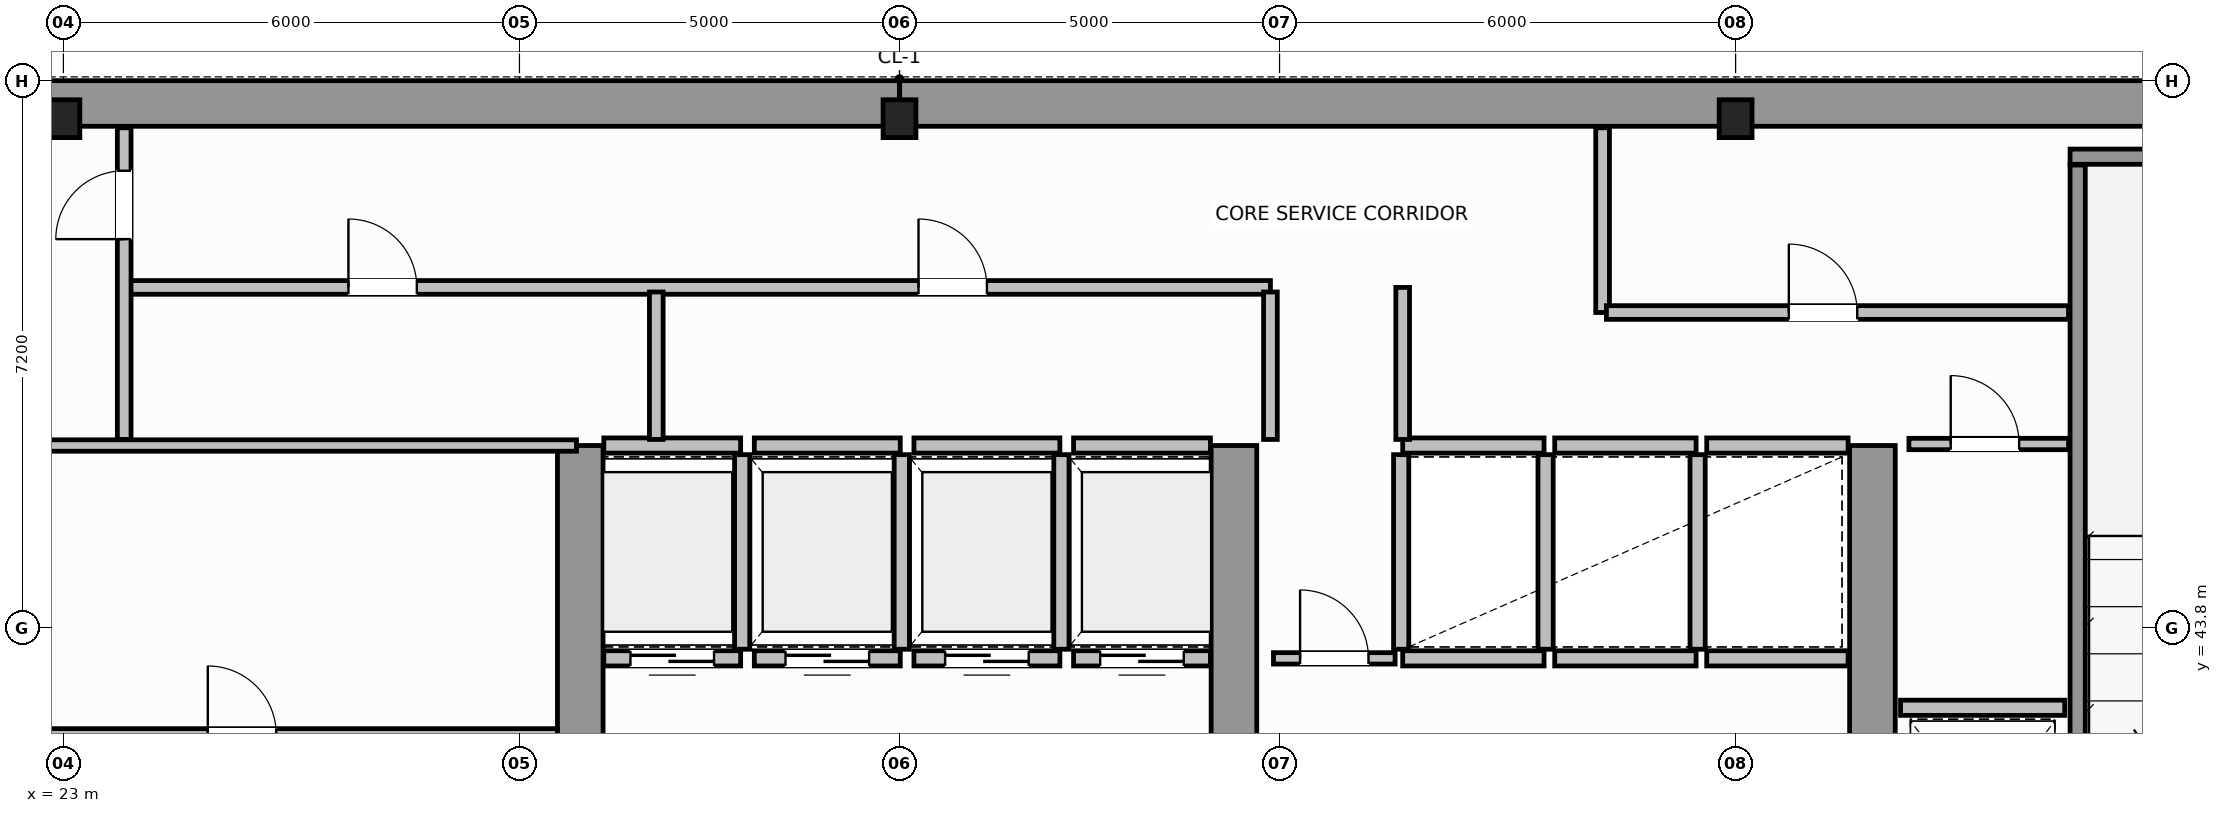
"""IFC4 building model, lengths in metres.
Left out: names, types, materials, properties, quantities, classifications, styles, units other than length and angle.
Written with IfcOpenShell. Run it as: python <this file> out.ifc"""

import sys

from ifc_helpers import new_model, si_unit, direction, frame, frame_2d, origin, origin_2d, place, context, subcontext, project, spatial, rectangle, i_section, extrude, source, transform, mapped, element, fill, save


model = new_model("IFC4")
c1 = context("Model", 3, precision=1e-05, world=origin(), true_north=direction((0.0, 1.0)))
c2 = subcontext(c1, "Body", "Model", "MODEL_VIEW")
j1 = project(units=[si_unit("LENGTHUNIT", "METRE"), si_unit("PLANEANGLEUNIT", "RADIAN")], contexts=[c1])
p1 = place(None, origin())
s1 = spatial("IfcSite", under=j1, at=p1, CompositionType="ELEMENT")
p2 = place(p1, origin())
s2 = spatial("IfcBuilding", under=s1, at=p2, CompositionType="ELEMENT")
p3 = place(p2, frame((0.0, 0.0, 169.0)))
s3 = spatial("IfcBuildingStorey", under=s2, at=p3, CompositionType="ELEMENT", Elevation=169.0)
m1 = source(origin(), c2, "Body", "SweptSolid", [
    extrude(i_section(OverallWidth=0.432, OverallDepth=0.498, WebThickness=0.055, FlangeThickness=0.068, FilletRadius=0.015, at=origin_2d()), origin(), (0.0, 0.0, 1.0), 3.8),
])
for number, where, z_axis, x_axis in (
    (1, (23.0, 50.5, 0.0), (0.0, 0.0, 1.0), (1.0, 0.0, 0.0)),
    (2, (34.0, 50.5, 0.0), (0.0, 0.0, 1.0), (1.0, 0.0, 0.0)),
    (3, (45.0, 50.5, 0.0), (0.0, 0.0, 1.0), (1.0, 0.0, 0.0)),
):
    element("IfcColumn", number, at=place(p3, frame(where, z_axis=z_axis, x_axis=x_axis)), inside=s3, PredefinedType="COLUMN", context=c2, shape_type="MappedRepresentation", body=[
        mapped(m1, transform((0.0, 0.0, 0.0), scale=1.0)),
    ])
for number, where, z_axis, x_axis in (
    (4, (14.304, 50.7, 0.0), (0.0, 0.0, 1.0), (1.0, 0.0, 0.0)),
    (5, (34.002, 50.7, 0.0), (0.0, 0.0, 1.0), (1.0, 0.0, 0.0)),
):
    element("IfcWall", number, at=place(p3, frame(where, z_axis=z_axis, x_axis=x_axis)), inside=s3, PredefinedType="SHEAR", context=c2, shape_type="SweptSolid", body=[
        extrude(rectangle(XDim=19.694, YDim=0.6, at=frame_2d((9.847, 0.0))), origin(), (0.0, 0.0, 1.0), 3.8),
    ])
for number, where, z_axis, x_axis in (
    (6, (29.8, 36.82, 0.0), (0.0, 0.0, 1.0), (0.0, 1.0, 0.0)),
    (7, (38.4, 36.82, 0.0), (0.0, 0.0, 1.0), (0.0, 1.0, 0.0)),
    (8, (46.8, 36.82, 0.0), (0.0, 0.0, 1.0), (0.0, 1.0, 0.0)),
):
    element("IfcWall", number, at=place(p3, frame(where, z_axis=z_axis, x_axis=x_axis)), inside=s3, PredefinedType="SHEAR", context=c2, shape_type="SweptSolid", body=[
        extrude(rectangle(XDim=9.38, YDim=0.6, at=frame_2d((4.69, 0.0))), origin(), (0.0, 0.0, 1.0), 3.8),
    ])
p4 = place(p3, frame((49.4, 50.0, 0.0), z_axis=(0.0, 0.0, 1.0), x_axis=(1.0, 0.0, 0.0)))
e9 = element("IfcWall", 9, at=p4, inside=s3, PredefinedType="SOLIDWALL", context=c2, shape_type="SweptSolid", body=[
    extrude(rectangle(XDim=4.3, YDim=0.2, at=frame_2d((2.15, 0.0))), origin(), (0.0, 0.0, 1.0), 3.8),
])
p5 = place(p3, frame((49.5, 39.96, 0.0), z_axis=(0.0, 0.0, 1.0), x_axis=(0.0, 1.0, 0.0)))
e10 = element("IfcWall", 10, at=p5, inside=s3, PredefinedType="SOLIDWALL", context=c2, shape_type="SweptSolid", body=[
    extrude(rectangle(XDim=9.93, YDim=0.2, at=frame_2d((4.965, 0.0))), origin(), (0.0, 0.0, 1.0), 3.8),
])
p6 = place(p3, frame((30.11, 43.4, 0.0), z_axis=(0.0, 0.0, 1.0), x_axis=(1.0, 0.0, 0.0)))
e11 = element("IfcWall", 11, at=p6, inside=s3, PredefinedType="SOLIDWALL", context=c2, shape_type="SweptSolid", body=[
    extrude(rectangle(XDim=1.8, YDim=0.2, at=frame_2d((0.9, 0.0))), origin(), (0.0, 0.0, 1.0), 3.58),
])
p7 = place(p6, frame((0.35, 0.0, 0.0)))
e12 = element("IfcOpeningElement", 12, at=p7, cuts=e11, PredefinedType="OPENING", context=c2, shape_type="SweptSolid", body=[
    extrude(rectangle(XDim=1.1, YDim=2.15, at=frame_2d((0.55, 1.075))), frame((0.0, 0.11, 0.0), z_axis=(0.0, -1.0, 0.0), x_axis=(1.0, 0.0, 0.0)), (0.0, 0.0, 1.0), 0.22),
])
p8 = place(p3, frame((30.11, 46.2, 0.0), z_axis=(0.0, 0.0, 1.0), x_axis=(1.0, 0.0, 0.0)))
e13 = element("IfcWall", 13, at=p8, inside=s3, PredefinedType="SOLIDWALL", context=c2, shape_type="SweptSolid", body=[
    extrude(rectangle(XDim=1.8, YDim=0.2, at=frame_2d((0.9, 0.0))), origin(), (0.0, 0.0, 1.0), 3.58),
])
p9 = place(p3, frame((31.93, 43.52, 0.0), z_axis=(0.0, 0.0, 1.0), x_axis=(0.0, 1.0, 0.0)))
e14 = element("IfcWall", 14, at=p9, inside=s3, PredefinedType="SOLIDWALL", context=c2, shape_type="SweptSolid", body=[
    extrude(rectangle(XDim=2.56, YDim=0.2, at=frame_2d((1.28, 0.0))), origin(), (0.0, 0.0, 1.0), 3.58),
])
p10 = place(p3, frame((32.09, 43.4, 0.0), z_axis=(0.0, 0.0, 1.0), x_axis=(1.0, 0.0, 0.0)))
e15 = element("IfcWall", 15, at=p10, inside=s3, PredefinedType="SOLIDWALL", context=c2, shape_type="SweptSolid", body=[
    extrude(rectangle(XDim=1.92, YDim=0.2, at=frame_2d((0.96, 0.0))), origin(), (0.0, 0.0, 1.0), 3.58),
])
p11 = place(p10, frame((0.41, 0.0, 0.0)))
e16 = element("IfcOpeningElement", 16, at=p11, cuts=e15, PredefinedType="OPENING", context=c2, shape_type="SweptSolid", body=[
    extrude(rectangle(XDim=1.1, YDim=2.15, at=frame_2d((0.55, 1.075))), frame((0.0, 0.11, 0.0), z_axis=(0.0, -1.0, 0.0), x_axis=(1.0, 0.0, 0.0)), (0.0, 0.0, 1.0), 0.22),
])
p12 = place(p3, frame((32.09, 46.2, 0.0), z_axis=(0.0, 0.0, 1.0), x_axis=(1.0, 0.0, 0.0)))
e17 = element("IfcWall", 17, at=p12, inside=s3, PredefinedType="SOLIDWALL", context=c2, shape_type="SweptSolid", body=[
    extrude(rectangle(XDim=1.92, YDim=0.2, at=frame_2d((0.96, 0.0))), origin(), (0.0, 0.0, 1.0), 3.58),
])
p13 = place(p3, frame((34.03, 43.52, 0.0), z_axis=(0.0, 0.0, 1.0), x_axis=(0.0, 1.0, 0.0)))
e18 = element("IfcWall", 18, at=p13, inside=s3, PredefinedType="SOLIDWALL", context=c2, shape_type="SweptSolid", body=[
    extrude(rectangle(XDim=2.56, YDim=0.2, at=frame_2d((1.28, 0.0))), origin(), (0.0, 0.0, 1.0), 3.58),
])
p14 = place(p3, frame((34.19, 43.4, 0.0), z_axis=(0.0, 0.0, 1.0), x_axis=(1.0, 0.0, 0.0)))
e19 = element("IfcWall", 19, at=p14, inside=s3, PredefinedType="SOLIDWALL", context=c2, shape_type="SweptSolid", body=[
    extrude(rectangle(XDim=1.92, YDim=0.2, at=frame_2d((0.96, 0.0))), origin(), (0.0, 0.0, 1.0), 3.58),
])
p15 = place(p14, frame((0.41, 0.0, 0.0)))
e20 = element("IfcOpeningElement", 20, at=p15, cuts=e19, PredefinedType="OPENING", context=c2, shape_type="SweptSolid", body=[
    extrude(rectangle(XDim=1.1, YDim=2.15, at=frame_2d((0.55, 1.075))), frame((0.0, 0.11, 0.0), z_axis=(0.0, -1.0, 0.0), x_axis=(1.0, 0.0, 0.0)), (0.0, 0.0, 1.0), 0.22),
])
p16 = place(p3, frame((34.19, 46.2, 0.0), z_axis=(0.0, 0.0, 1.0), x_axis=(1.0, 0.0, 0.0)))
e21 = element("IfcWall", 21, at=p16, inside=s3, PredefinedType="SOLIDWALL", context=c2, shape_type="SweptSolid", body=[
    extrude(rectangle(XDim=1.92, YDim=0.2, at=frame_2d((0.96, 0.0))), origin(), (0.0, 0.0, 1.0), 3.58),
])
p17 = place(p3, frame((36.13, 43.52, 0.0), z_axis=(0.0, 0.0, 1.0), x_axis=(0.0, 1.0, 0.0)))
e22 = element("IfcWall", 22, at=p17, inside=s3, PredefinedType="SOLIDWALL", context=c2, shape_type="SweptSolid", body=[
    extrude(rectangle(XDim=2.56, YDim=0.2, at=frame_2d((1.28, 0.0))), origin(), (0.0, 0.0, 1.0), 3.58),
])
p18 = place(p3, frame((36.29, 43.4, 0.0), z_axis=(0.0, 0.0, 1.0), x_axis=(1.0, 0.0, 0.0)))
e23 = element("IfcWall", 23, at=p18, inside=s3, PredefinedType="SOLIDWALL", context=c2, shape_type="SweptSolid", body=[
    extrude(rectangle(XDim=1.8, YDim=0.2, at=frame_2d((0.9, 0.0))), origin(), (0.0, 0.0, 1.0), 3.58),
])
p19 = place(p18, frame((0.35, 0.0, 0.0)))
e24 = element("IfcOpeningElement", 24, at=p19, cuts=e23, PredefinedType="OPENING", context=c2, shape_type="SweptSolid", body=[
    extrude(rectangle(XDim=1.1, YDim=2.15, at=frame_2d((0.55, 1.075))), frame((0.0, 0.11, 0.0), z_axis=(0.0, -1.0, 0.0), x_axis=(1.0, 0.0, 0.0)), (0.0, 0.0, 1.0), 0.22),
])
p20 = place(p3, frame((36.29, 46.2, 0.0), z_axis=(0.0, 0.0, 1.0), x_axis=(1.0, 0.0, 0.0)))
e25 = element("IfcWall", 25, at=p20, inside=s3, PredefinedType="SOLIDWALL", context=c2, shape_type="SweptSolid", body=[
    extrude(rectangle(XDim=1.8, YDim=0.2, at=frame_2d((0.9, 0.0))), origin(), (0.0, 0.0, 1.0), 3.58),
])
for number, where, z_axis, x_axis in (
    (26, (40.62, 43.4, 0.0), (0.0, 0.0, 1.0), (1.0, 0.0, 0.0)),
    (27, (40.62, 46.2, 0.0), (0.0, 0.0, 1.0), (1.0, 0.0, 0.0)),
):
    element("IfcWall", number, at=place(p3, frame(where, z_axis=z_axis, x_axis=x_axis)), inside=s3, PredefinedType="SOLIDWALL", context=c2, shape_type="SweptSolid", body=[
        extrude(rectangle(XDim=1.86, YDim=0.2, at=frame_2d((0.93, 0.0))), origin(), (0.0, 0.0, 1.0), 3.58),
    ])
for number, where, z_axis, x_axis in (
    (28, (40.6, 43.52, 0.0), (0.0, 0.0, 1.0), (0.0, 1.0, 0.0)),
    (29, (42.5, 43.52, 0.0), (0.0, 0.0, 1.0), (0.0, 1.0, 0.0)),
):
    element("IfcWall", number, at=place(p3, frame(where, z_axis=z_axis, x_axis=x_axis)), inside=s3, PredefinedType="SOLIDWALL", context=c2, shape_type="SweptSolid", body=[
        extrude(rectangle(XDim=2.56, YDim=0.2, at=frame_2d((1.28, 0.0))), origin(), (0.0, 0.0, 1.0), 3.58),
    ])
for number, where, z_axis, x_axis in (
    (30, (42.62, 43.4, 0.0), (0.0, 0.0, 1.0), (1.0, 0.0, 0.0)),
    (31, (42.62, 46.2, 0.0), (0.0, 0.0, 1.0), (1.0, 0.0, 0.0)),
):
    element("IfcWall", number, at=place(p3, frame(where, z_axis=z_axis, x_axis=x_axis)), inside=s3, PredefinedType="SOLIDWALL", context=c2, shape_type="SweptSolid", body=[
        extrude(rectangle(XDim=1.86, YDim=0.2, at=frame_2d((0.93, 0.0))), origin(), (0.0, 0.0, 1.0), 3.58),
    ])
p21 = place(p3, frame((44.5, 43.52, 0.0), z_axis=(0.0, 0.0, 1.0), x_axis=(0.0, 1.0, 0.0)))
e32 = element("IfcWall", 32, at=p21, inside=s3, PredefinedType="SOLIDWALL", context=c2, shape_type="SweptSolid", body=[
    extrude(rectangle(XDim=2.56, YDim=0.2, at=frame_2d((1.28, 0.0))), origin(), (0.0, 0.0, 1.0), 3.58),
])
for number, where, z_axis, x_axis in (
    (33, (44.62, 43.4, 0.0), (0.0, 0.0, 1.0), (1.0, 0.0, 0.0)),
    (34, (44.62, 46.2, 0.0), (0.0, 0.0, 1.0), (1.0, 0.0, 0.0)),
):
    element("IfcWall", number, at=place(p3, frame(where, z_axis=z_axis, x_axis=x_axis)), inside=s3, PredefinedType="SOLIDWALL", context=c2, shape_type="SweptSolid", body=[
        extrude(rectangle(XDim=1.86, YDim=0.2, at=frame_2d((0.93, 0.0))), origin(), (0.0, 0.0, 1.0), 3.58),
    ])
p22 = place(p3, frame((47.17, 42.75, 0.0), z_axis=(0.0, 0.0, 1.0), x_axis=(1.0, 0.0, 0.0)))
e35 = element("IfcWall", 35, at=p22, inside=s3, PredefinedType="SOLIDWALL", context=c2, shape_type="SweptSolid", body=[
    extrude(rectangle(XDim=2.16, YDim=0.2, at=frame_2d((1.08, 0.0))), origin(), (0.0, 0.0, 1.0), 3.58),
])
p23 = place(p3, frame((21.25, 46.2, 0.0), z_axis=(0.0, 0.0, 1.0), x_axis=(1.0, 0.0, 0.0)))
e36 = element("IfcWall", 36, at=p23, inside=s3, PredefinedType="PARTITIONING", context=c2, shape_type="SweptSolid", body=[
    extrude(rectangle(XDim=8.5, YDim=0.15, at=frame_2d((4.25, 0.0))), origin(), (0.0, 0.0, 1.0), 3.58),
])
p24 = place(p3, frame((21.5, 42.4, 0.0), z_axis=(0.0, 0.0, 1.0), x_axis=(1.0, 0.0, 0.0)))
e37 = element("IfcWall", 37, at=p24, inside=s3, PredefinedType="PARTITIONING", context=c2, shape_type="SweptSolid", body=[
    extrude(rectangle(XDim=8.0, YDim=0.15, at=frame_2d((4.0, 0.0))), origin(), (0.0, 0.0, 1.0), 3.58),
])
p25 = place(p24, frame((3.4, 0.0, 0.0)))
e38 = element("IfcOpeningElement", 38, at=p25, cuts=e37, PredefinedType="OPENING", context=c2, shape_type="SweptSolid", body=[
    extrude(rectangle(XDim=0.9, YDim=2.1, at=frame_2d((0.45, 1.05))), frame((0.0, 0.085, 0.0), z_axis=(0.0, -1.0, 0.0), x_axis=(1.0, 0.0, 0.0)), (0.0, 0.0, 1.0), 0.17),
])
p26 = place(p3, frame((47.28, 46.22, 0.0), z_axis=(0.0, 0.0, 1.0), x_axis=(1.0, 0.0, 0.0)))
e39 = element("IfcWall", 39, at=p26, inside=s3, PredefinedType="PARTITIONING", context=c2, shape_type="SweptSolid", body=[
    extrude(rectangle(XDim=2.1, YDim=0.15, at=frame_2d((1.05, 0.0))), origin(), (0.0, 0.0, 1.0), 3.58),
])
p27 = place(p26, frame((0.55, 0.0, 0.0)))
e40 = element("IfcOpeningElement", 40, at=p27, cuts=e39, PredefinedType="OPENING", context=c2, shape_type="SweptSolid", body=[
    extrude(rectangle(XDim=0.9, YDim=2.1, at=frame_2d((0.45, 1.05))), frame((0.0, 0.085, 0.0), z_axis=(0.0, -1.0, 0.0), x_axis=(1.0, 0.0, 0.0)), (0.0, 0.0, 1.0), 0.17),
])
p28 = place(p3, frame((38.92, 43.4, 0.0), z_axis=(0.0, 0.0, 1.0), x_axis=(1.0, 0.0, 0.0)))
e41 = element("IfcWall", 41, at=p28, inside=s3, PredefinedType="PARTITIONING", context=c2, shape_type="SweptSolid", body=[
    extrude(rectangle(XDim=1.6, YDim=0.15, at=frame_2d((0.8, 0.0))), origin(), (0.0, 0.0, 1.0), 3.58),
])
p29 = place(p28, frame((0.35, 0.0, 0.0)))
e42 = element("IfcOpeningElement", 42, at=p29, cuts=e41, PredefinedType="OPENING", context=c2, shape_type="SweptSolid", body=[
    extrude(rectangle(XDim=0.9, YDim=2.1, at=frame_2d((0.45, 1.05))), frame((0.0, 0.085, 0.0), z_axis=(0.0, -1.0, 0.0), x_axis=(1.0, 0.0, 0.0)), (0.0, 0.0, 1.0), 0.17),
])
p30 = place(p3, frame((23.85, 48.28, 0.0), z_axis=(0.0, 0.0, 1.0), x_axis=(1.0, 0.0, 0.0)))
e43 = element("IfcWall", 43, at=p30, inside=s3, PredefinedType="PLUMBINGWALL", context=c2, shape_type="SweptSolid", body=[
    extrude(rectangle(XDim=15.03, YDim=0.18, at=frame_2d((7.515, 0.0))), origin(), (0.0, 0.0, 1.0), 3.58),
])
p31 = place(p30, frame((2.9, 0.0, 0.0)))
e44 = element("IfcOpeningElement", 44, at=p31, cuts=e43, PredefinedType="OPENING", context=c2, shape_type="SweptSolid", body=[
    extrude(rectangle(XDim=0.9, YDim=2.15, at=frame_2d((0.45, 1.075))), frame((0.0, 0.1, 0.0), z_axis=(0.0, -1.0, 0.0), x_axis=(1.0, 0.0, 0.0)), (0.0, 0.0, 1.0), 0.2),
])
p32 = place(p30, frame((10.4, 0.0, 0.0)))
e45 = element("IfcOpeningElement", 45, at=p32, cuts=e43, PredefinedType="OPENING", context=c2, shape_type="SweptSolid", body=[
    extrude(rectangle(XDim=0.9, YDim=2.15, at=frame_2d((0.45, 1.075))), frame((0.0, 0.1, 0.0), z_axis=(0.0, -1.0, 0.0), x_axis=(1.0, 0.0, 0.0)), (0.0, 0.0, 1.0), 0.2),
])
p33 = place(p3, frame((23.8, 46.28, 0.0), z_axis=(0.0, 0.0, 1.0), x_axis=(0.0, 1.0, 0.0)))
e46 = element("IfcWall", 46, at=p33, inside=s3, PredefinedType="PLUMBINGWALL", context=c2, shape_type="SweptSolid", body=[
    extrude(rectangle(XDim=4.1, YDim=0.18, at=frame_2d((2.05, 0.0))), origin(), (0.0, 0.0, 1.0), 3.58),
])
p34 = place(p33, frame((2.635, 0.0, 0.0)))
e47 = element("IfcOpeningElement", 47, at=p34, cuts=e46, PredefinedType="OPENING", context=c2, shape_type="SweptSolid", body=[
    extrude(rectangle(XDim=0.9, YDim=2.15, at=frame_2d((0.45, 1.075))), frame((0.0, 0.1, 0.0), z_axis=(0.0, -1.0, 0.0), x_axis=(1.0, 0.0, 0.0)), (0.0, 0.0, 1.0), 0.2),
])
for number, where, z_axis, x_axis in (
    (48, (30.8, 46.28, 0.0), (0.0, 0.0, 1.0), (0.0, 1.0, 0.0)),
    (49, (38.88, 46.28, 0.0), (0.0, 0.0, 1.0), (0.0, 1.0, 0.0)),
):
    element("IfcWall", number, at=place(p3, frame(where, z_axis=z_axis, x_axis=x_axis)), inside=s3, PredefinedType="PLUMBINGWALL", context=c2, shape_type="SweptSolid", body=[
        extrude(rectangle(XDim=1.94, YDim=0.18, at=frame_2d((0.97, 0.0))), origin(), (0.0, 0.0, 1.0), 3.58),
    ])
p35 = place(p3, frame((40.62, 46.28, 0.0), z_axis=(0.0, 0.0, 1.0), x_axis=(0.0, 1.0, 0.0)))
e50 = element("IfcWall", 50, at=p35, inside=s3, PredefinedType="PLUMBINGWALL", context=c2, shape_type="SweptSolid", body=[
    extrude(rectangle(XDim=2.0, YDim=0.18, at=frame_2d((1.0, 0.0))), origin(), (0.0, 0.0, 1.0), 3.58),
])
p36 = place(p3, frame((43.25, 47.95, 0.0), z_axis=(0.0, 0.0, 1.0), x_axis=(0.0, 1.0, 0.0)))
e51 = element("IfcWall", 51, at=p36, inside=s3, PredefinedType="PLUMBINGWALL", context=c2, shape_type="SweptSolid", body=[
    extrude(rectangle(XDim=2.43, YDim=0.18, at=frame_2d((1.215, 0.0))), origin(), (0.0, 0.0, 1.0), 3.58),
])
p37 = place(p3, frame((43.3, 47.95, 0.0), z_axis=(0.0, 0.0, 1.0), x_axis=(1.0, 0.0, 0.0)))
e52 = element("IfcWall", 52, at=p37, inside=s3, PredefinedType="PLUMBINGWALL", context=c2, shape_type="SweptSolid", body=[
    extrude(rectangle(XDim=6.08, YDim=0.18, at=frame_2d((3.04, 0.0))), origin(), (0.0, 0.0, 1.0), 3.58),
])
p38 = place(p37, frame((2.4, 0.0, 0.0)))
e53 = element("IfcOpeningElement", 53, at=p38, cuts=e52, PredefinedType="OPENING", context=c2, shape_type="SweptSolid", body=[
    extrude(rectangle(XDim=0.9, YDim=2.15, at=frame_2d((0.45, 1.075))), frame((0.0, 0.1, 0.0), z_axis=(0.0, -1.0, 0.0), x_axis=(1.0, 0.0, 0.0)), (0.0, 0.0, 1.0), 0.2),
])
m2 = source(origin(), c2, "Body", "SweptSolid", [
    extrude(rectangle(XDim=1.1, YDim=2.15, at=frame_2d((0.55, 1.075))), frame((0.0, 0.025, 0.0), z_axis=(0.0, -1.0, 0.0), x_axis=(1.0, 0.0, 0.0)), (0.0, 0.0, 1.0), 0.05),
])
p39 = place(p7, origin())
e54 = element("IfcDoor", 54, at=p39, inside=s3, OperationType="DOUBLE_DOOR_SLIDING", PredefinedType="DOOR", context=c2, shape_type="MappedRepresentation", body=[
    mapped(m2, transform((0.0, 0.0, 0.0), scale=1.0)),
])
fill(e12, e54)
p40 = place(p11, origin())
e55 = element("IfcDoor", 55, at=p40, inside=s3, OperationType="DOUBLE_DOOR_SLIDING", PredefinedType="DOOR", context=c2, shape_type="MappedRepresentation", body=[
    mapped(m2, transform((0.0, 0.0, 0.0), scale=1.0)),
])
fill(e16, e55)
p41 = place(p15, origin())
e56 = element("IfcDoor", 56, at=p41, inside=s3, OperationType="DOUBLE_DOOR_SLIDING", PredefinedType="DOOR", context=c2, shape_type="MappedRepresentation", body=[
    mapped(m2, transform((0.0, 0.0, 0.0), scale=1.0)),
])
fill(e20, e56)
p42 = place(p19, origin())
e57 = element("IfcDoor", 57, at=p42, inside=s3, OperationType="DOUBLE_DOOR_SLIDING", PredefinedType="DOOR", context=c2, shape_type="MappedRepresentation", body=[
    mapped(m2, transform((0.0, 0.0, 0.0), scale=1.0)),
])
fill(e24, e57)
m3 = source(origin(), c2, "Body", "SweptSolid", [
    extrude(rectangle(XDim=0.9, YDim=2.1, at=frame_2d((0.45, 1.05))), frame((0.0, 0.025, 0.0), z_axis=(0.0, -1.0, 0.0), x_axis=(1.0, 0.0, 0.0)), (0.0, 0.0, 1.0), 0.05),
])
p43 = place(p25, origin())
e58 = element("IfcDoor", 58, at=p43, inside=s3, OperationType="SINGLE_SWING_RIGHT", PredefinedType="DOOR", context=c2, shape_type="MappedRepresentation", body=[
    mapped(m3, transform((0.0, 0.0, 0.0), scale=1.0)),
])
fill(e38, e58)
p44 = place(p27, origin())
e59 = element("IfcDoor", 59, at=p44, inside=s3, OperationType="SINGLE_SWING_RIGHT", PredefinedType="DOOR", context=c2, shape_type="MappedRepresentation", body=[
    mapped(m3, transform((0.0, 0.0, 0.0), scale=1.0)),
])
fill(e40, e59)
p45 = place(p29, origin())
e60 = element("IfcDoor", 60, at=p45, inside=s3, OperationType="SINGLE_SWING_LEFT", PredefinedType="DOOR", context=c2, shape_type="MappedRepresentation", body=[
    mapped(m3, transform((0.0, 0.0, 0.0), scale=1.0)),
])
fill(e42, e60)
m4 = source(origin(), c2, "Body", "SweptSolid", [
    extrude(rectangle(XDim=0.9, YDim=2.15, at=frame_2d((0.45, 1.075))), frame((0.0, 0.025, 0.0), z_axis=(0.0, -1.0, 0.0), x_axis=(1.0, 0.0, 0.0)), (0.0, 0.0, 1.0), 0.05),
])
p46 = place(p34, origin())
e61 = element("IfcDoor", 61, at=p46, inside=s3, OperationType="SINGLE_SWING_LEFT", PredefinedType="DOOR", context=c2, shape_type="MappedRepresentation", body=[
    mapped(m4, transform((0.0, 0.0, 0.0), scale=1.0)),
])
fill(e47, e61)
p47 = place(p31, origin())
e62 = element("IfcDoor", 62, at=p47, inside=s3, OperationType="SINGLE_SWING_RIGHT", PredefinedType="DOOR", context=c2, shape_type="MappedRepresentation", body=[
    mapped(m4, transform((0.0, 0.0, 0.0), scale=1.0)),
])
fill(e44, e62)
p48 = place(p32, origin())
e63 = element("IfcDoor", 63, at=p48, inside=s3, OperationType="SINGLE_SWING_LEFT", PredefinedType="DOOR", context=c2, shape_type="MappedRepresentation", body=[
    mapped(m4, transform((0.0, 0.0, 0.0), scale=1.0)),
])
fill(e45, e63)
p49 = place(p38, origin())
e64 = element("IfcDoor", 64, at=p49, inside=s3, OperationType="SINGLE_SWING_RIGHT", PredefinedType="DOOR", context=c2, shape_type="MappedRepresentation", body=[
    mapped(m4, transform((0.0, 0.0, 0.0), scale=1.0)),
])
fill(e53, e64)
save(model, sys.argv[1])
